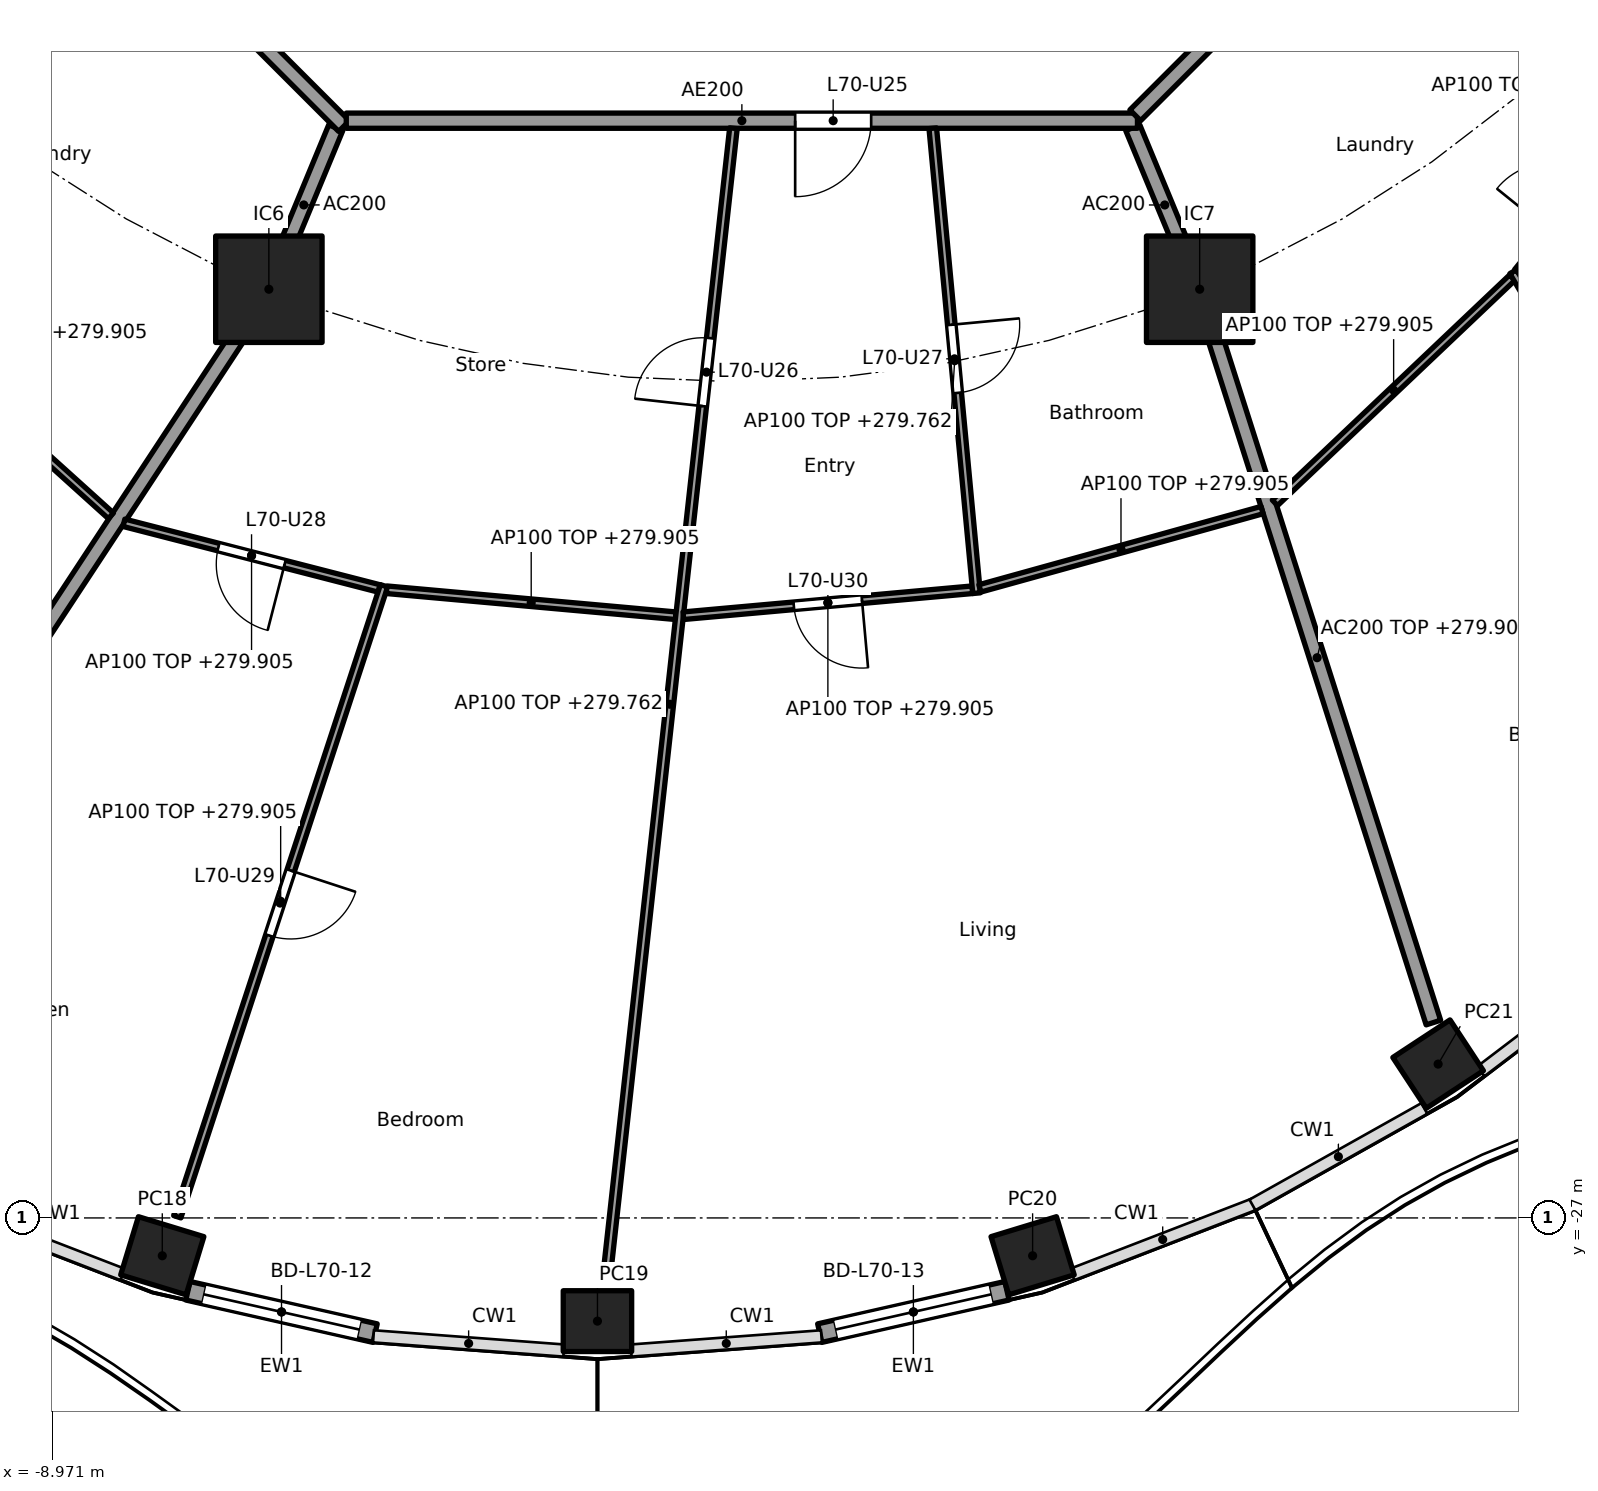
"""IFC4 building model, lengths in metres.
Left out: names, types, materials, properties, quantities, classifications, styles, units other than length and angle.
Written with IfcOpenShell. Run it as: python <this file> out.ifc"""

import sys

from ifc_helpers import new_model, si_unit, direction, frame, frame_2d, origin, origin_2d, place, context, subcontext, project, spatial, rectangle, hollow_rectangle, extrude, element, fill, save


model = new_model("IFC4")
c1 = context("Model", 3, precision=1e-05, world=origin(), true_north=direction((0.0, 1.0)))
c2 = subcontext(c1, "Body", "Model", "MODEL_VIEW")
j1 = project(units=[si_unit("LENGTHUNIT", "METRE"), si_unit("PLANEANGLEUNIT", "RADIAN")], contexts=[c1])
p1 = place(None, origin())
s1 = spatial("IfcSite", under=j1, at=p1, CompositionType="ELEMENT")
p2 = place(p1, origin())
s2 = spatial("IfcBuilding", under=s1, at=p2, CompositionType="ELEMENT")
p3 = place(p2, frame((0.0, 0.0, 277.0)))
s3 = spatial("IfcBuildingStorey", under=s2, at=p3, CompositionType="ELEMENT", Elevation=277.0)
for number, where, z_axis, x_axis in (
    (1, (-7.525, -27.498, 0.0), (0.0, 0.0, 1.0), (0.957, -0.292, 0.0)),
    (2, (-1.8, -28.358, 0.0), (0.0, 0.0, 1.0), (1.0, 0.0, 0.0)),
    (3, (3.925, -27.498, 0.0), (0.0, 0.0, 1.0), (0.957, 0.292, 0.0)),
    (4, (9.26, -24.976, 0.0), (0.0, 0.0, 1.0), (0.836, 0.549, 0.0)),
):
    element("IfcColumn", number, at=place(p3, frame(where, z_axis=z_axis, x_axis=x_axis)), inside=s3, PredefinedType="COLUMN", context=c2, shape_type="SweptSolid", body=[
        extrude(hollow_rectangle(XDim=0.9, YDim=0.8, WallThickness=0.028, at=origin_2d()), origin(), (0.0, 0.0, 1.0), 3.7),
    ])
for number, where, z_axis, x_axis in (
    (5, (-6.123, -14.782, 0.0), (0.0, 0.0, 1.0), (1.0, 0.0, 0.0)),
    (6, (6.123, -14.782, 0.0), (0.0, 0.0, 1.0), (1.0, 0.0, 0.0)),
):
    element("IfcColumn", number, at=place(p3, frame(where, z_axis=z_axis, x_axis=x_axis)), inside=s3, PredefinedType="COLUMN", context=c2, shape_type="SweptSolid", body=[
        extrude(rectangle(XDim=1.4, YDim=1.4, at=origin_2d()), origin(), (0.0, 0.0, 1.0), 3.7),
    ])
p4 = place(p3, frame((-4.725, -28.516, 0.0), z_axis=(0.0, 0.0, 1.0), x_axis=(-0.975319584032, 0.220797891756, 0.0)))
e7 = element("IfcWall", 7, at=p4, inside=s3, PredefinedType="SOLIDWALL", context=c2, shape_type="SweptSolid", body=[
    extrude(rectangle(XDim=2.525, YDim=0.25, at=frame_2d((1.263, 0.0))), origin(), (0.0, 0.0, 1.0), 3.44),
])
p5 = place(p4, frame((0.213, 0.0, 0.0)))
e8 = element("IfcOpeningElement", 8, at=p5, cuts=e7, PredefinedType="OPENING", context=c2, shape_type="SweptSolid", body=[
    extrude(rectangle(XDim=2.1, YDim=2.4, at=frame_2d((1.05, 1.2))), frame((0.0, 0.135, 0.0), z_axis=(0.0, -1.0, 0.0), x_axis=(1.0, 0.0, 0.0)), (0.0, 0.0, 1.0), 0.27),
])
p6 = place(p3, frame((3.588, -27.958, 0.0), z_axis=(0.0, 0.0, 1.0), x_axis=(-0.97531487046, -0.22081871175, 0.0)))
e9 = element("IfcWall", 9, at=p6, inside=s3, PredefinedType="SOLIDWALL", context=c2, shape_type="SweptSolid", body=[
    extrude(rectangle(XDim=2.525, YDim=0.25, at=frame_2d((1.263, 0.0))), origin(), (0.0, 0.0, 1.0), 3.44),
])
p7 = place(p6, frame((0.213, 0.0, 0.0)))
e10 = element("IfcOpeningElement", 10, at=p7, cuts=e9, PredefinedType="OPENING", context=c2, shape_type="SweptSolid", body=[
    extrude(rectangle(XDim=2.1, YDim=2.4, at=frame_2d((1.05, 1.2))), frame((0.0, 0.135, 0.0), z_axis=(0.0, -1.0, 0.0), x_axis=(1.0, 0.0, 0.0)), (0.0, 0.0, 1.0), 0.27),
])
p8 = place(p3, frame((-5.243, -12.657, 0.0), z_axis=(0.0, 0.0, 1.0), x_axis=(-0.382770106157, -0.923843626288, 0.0)))
e11 = element("IfcWall", 11, at=p8, inside=s3, PredefinedType="PARTITIONING", context=c2, shape_type="SweptSolid", body=[
    extrude(rectangle(XDim=2.199, YDim=0.2, at=frame_2d((1.1, 0.0))), origin(), (0.0, 0.0, 1.0), 3.44),
])
p9 = place(p3, frame((-6.151, -14.824, 0.0), z_axis=(0.0, 0.0, 1.0), x_axis=(-0.549345577828, -0.835595258556, 0.0)))
e12 = element("IfcWall", 12, at=p9, inside=s3, PredefinedType="PARTITIONING", context=c2, shape_type="SweptSolid", body=[
    extrude(rectangle(XDim=11.62, YDim=0.2, at=frame_2d((5.81, 0.0))), origin(), (0.0, 0.0, 1.0), 2.905),
])
p10 = place(p3, frame((5.243, -12.657, 0.0), z_axis=(0.0, 0.0, 1.0), x_axis=(0.382707856524, -0.923869415315, 0.0)))
e13 = element("IfcWall", 13, at=p10, inside=s3, PredefinedType="PARTITIONING", context=c2, shape_type="SweptSolid", body=[
    extrude(rectangle(XDim=2.2, YDim=0.2, at=frame_2d((1.1, 0.0))), origin(), (0.0, 0.0, 1.0), 3.44),
])
p11 = place(p3, frame((6.138, -14.83, 0.0), z_axis=(0.0, 0.0, 1.0), x_axis=(0.303653679037, -0.952782474234, 0.0)))
e14 = element("IfcWall", 14, at=p11, inside=s3, PredefinedType="PARTITIONING", context=c2, shape_type="SweptSolid", body=[
    extrude(rectangle(XDim=10.076, YDim=0.2, at=frame_2d((5.038, 0.0))), origin(), (0.0, 0.0, 1.0), 2.905),
])
p12 = place(p3, frame((-12.635, -5.134, 0.0), z_axis=(0.0, 0.0, 1.0), x_axis=(0.707106781187, -0.707106781187, 0.0)))
e15 = element("IfcWall", 15, at=p12, inside=s3, PredefinedType="PARTITIONING", context=c2, shape_type="SweptSolid", body=[
    extrude(rectangle(XDim=10.609, YDim=0.2, at=frame_2d((5.305, 0.0))), origin(), (0.0, 0.0, 1.0), 3.44),
])
p13 = place(p3, frame((-5.104, -12.565, 0.0), z_axis=(0.0, 0.0, 1.0), x_axis=(1.0, 0.0, 0.0)))
e16 = element("IfcWall", 16, at=p13, inside=s3, PredefinedType="PARTITIONING", context=c2, shape_type="SweptSolid", body=[
    extrude(rectangle(XDim=10.409, YDim=0.2, at=frame_2d((5.205, 0.0))), origin(), (0.0, 0.0, 1.0), 3.44),
])
p14 = place(p13, frame((5.906, 0.0, 0.0)))
e17 = element("IfcOpeningElement", 17, at=p14, cuts=e16, PredefinedType="OPENING", context=c2, shape_type="SweptSolid", body=[
    extrude(rectangle(XDim=1.0, YDim=2.1, at=frame_2d((0.5, 1.05))), frame((0.0, 0.11, 0.0), z_axis=(0.0, -1.0, 0.0), x_axis=(1.0, 0.0, 0.0)), (0.0, 0.0, 1.0), 0.22),
])
p15 = place(p3, frame((5.275, -12.494, 0.0), z_axis=(0.0, 0.0, 1.0), x_axis=(0.707106781187, 0.707106781187, 0.0)))
e18 = element("IfcWall", 18, at=p15, inside=s3, PredefinedType="PARTITIONING", context=c2, shape_type="SweptSolid", body=[
    extrude(rectangle(XDim=10.409, YDim=0.2, at=frame_2d((5.205, 0.0))), origin(), (0.0, 0.0, 1.0), 3.44),
])
p16 = place(p3, frame((-8.958, -8.952, 0.0), z_axis=(0.0, 0.0, 1.0), x_axis=(-0.73876526954, -0.673962815385, 0.0)))
e19 = element("IfcWall", 19, at=p16, inside=s3, PredefinedType="PARTITIONING", context=c2, shape_type="SweptSolid", body=[
    extrude(rectangle(XDim=5.647, YDim=0.1, at=frame_2d((2.824, 0.0))), origin(), (0.0, 0.0, 1.0), 2.762),
])
p17 = place(p3, frame((-11.676, -14.628, 0.0), z_axis=(0.0, 0.0, 1.0), x_axis=(0.74245829867, -0.669892285921, 0.0)))
e20 = element("IfcWall", 20, at=p17, inside=s3, PredefinedType="PARTITIONING", context=c2, shape_type="SweptSolid", body=[
    extrude(rectangle(XDim=4.68, YDim=0.1, at=frame_2d((2.34, 0.0))), origin(), (0.0, 0.0, 1.0), 2.905),
])
p18 = place(p3, frame((-8.03, -17.854, 0.0), z_axis=(0.0, 0.0, 1.0), x_axis=(0.968441967324, -0.249239154077, 0.0)))
e21 = element("IfcWall", 21, at=p18, inside=s3, PredefinedType="PARTITIONING", context=c2, shape_type="SweptSolid", body=[
    extrude(rectangle(XDim=3.468, YDim=0.1, at=frame_2d((1.734, 0.0))), origin(), (0.0, 0.0, 1.0), 2.905),
])
p19 = place(p18, frame((1.284, 0.0, 0.0)))
e22 = element("IfcOpeningElement", 22, at=p19, cuts=e21, PredefinedType="OPENING", context=c2, shape_type="SweptSolid", body=[
    extrude(rectangle(XDim=0.9, YDim=2.1, at=frame_2d((0.45, 1.05))), frame((0.0, 0.06, 0.0), z_axis=(0.0, -1.0, 0.0), x_axis=(1.0, 0.0, 0.0)), (0.0, 0.0, 1.0), 0.12),
])
p20 = place(p3, frame((-4.608, -18.684, 0.0), z_axis=(0.0, 0.0, 1.0), x_axis=(-0.311419102378, -0.95027266754, 0.0)))
e23 = element("IfcWall", 23, at=p20, inside=s3, PredefinedType="PARTITIONING", context=c2, shape_type="SweptSolid", body=[
    extrude(rectangle(XDim=8.735, YDim=0.1, at=frame_2d((4.367, 0.0))), origin(), (0.0, 0.0, 1.0), 2.905),
])
p21 = place(p20, frame((3.942, 0.0, 0.0)))
e24 = element("IfcOpeningElement", 24, at=p21, cuts=e23, PredefinedType="OPENING", context=c2, shape_type="SweptSolid", body=[
    extrude(rectangle(XDim=0.9, YDim=2.1, at=frame_2d((0.45, 1.05))), frame((0.0, 0.06, 0.0), z_axis=(0.0, -1.0, 0.0), x_axis=(1.0, 0.0, 0.0)), (0.0, 0.0, 1.0), 0.12),
])
p22 = place(p3, frame((-4.573, -18.736, 0.0), z_axis=(0.0, 0.0, 1.0), x_axis=(0.995986472869, -0.089503887414, 0.0)))
e25 = element("IfcWall", 25, at=p22, inside=s3, PredefinedType="PARTITIONING", context=c2, shape_type="SweptSolid", body=[
    extrude(rectangle(XDim=3.819, YDim=0.1, at=frame_2d((1.909, 0.0))), origin(), (0.0, 0.0, 1.0), 2.905),
])
p23 = place(p3, frame((-0.011, -12.664, 0.0), z_axis=(0.0, 0.0, 1.0), x_axis=(-0.109805889692, -0.993953050495, 0.0)))
e26 = element("IfcWall", 26, at=p23, inside=s3, PredefinedType="PARTITIONING", context=c2, shape_type="SweptSolid", body=[
    extrude(rectangle(XDim=15.248, YDim=0.1, at=frame_2d((7.624, 0.0))), origin(), (0.0, 0.0, 1.0), 2.762),
])
p24 = place(p23, frame((2.778, 0.0, 0.0)))
e27 = element("IfcOpeningElement", 27, at=p24, cuts=e26, PredefinedType="OPENING", context=c2, shape_type="SweptSolid", body=[
    extrude(rectangle(XDim=0.9, YDim=2.1, at=frame_2d((0.45, 1.05))), frame((0.0, 0.06, 0.0), z_axis=(0.0, -1.0, 0.0), x_axis=(1.0, 0.0, 0.0)), (0.0, 0.0, 1.0), 0.12),
])
p25 = place(p3, frame((-0.67, -19.077, 0.0), z_axis=(0.0, 0.0, 1.0), x_axis=(0.995986472869, 0.089503887414, 0.0)))
e28 = element("IfcWall", 28, at=p25, inside=s3, PredefinedType="PARTITIONING", context=c2, shape_type="SweptSolid", body=[
    extrude(rectangle(XDim=3.819, YDim=0.1, at=frame_2d((1.909, 0.0))), origin(), (0.0, 0.0, 1.0), 2.905),
])
p26 = place(p25, frame((1.459, 0.0, 0.0)))
e29 = element("IfcOpeningElement", 29, at=p26, cuts=e28, PredefinedType="OPENING", context=c2, shape_type="SweptSolid", body=[
    extrude(rectangle(XDim=0.9, YDim=2.1, at=frame_2d((0.45, 1.05))), frame((0.0, 0.06, 0.0), z_axis=(0.0, -1.0, 0.0), x_axis=(1.0, 0.0, 0.0)), (0.0, 0.0, 1.0), 0.12),
])
p27 = place(p3, frame((2.612, -12.664, 0.0), z_axis=(0.0, 0.0, 1.0), x_axis=(0.093781393779, -0.995592813444, 0.0)))
e30 = element("IfcWall", 30, at=p27, inside=s3, PredefinedType="PARTITIONING", context=c2, shape_type="SweptSolid", body=[
    extrude(rectangle(XDim=6.144, YDim=0.1, at=frame_2d((3.072, 0.0))), origin(), (0.0, 0.0, 1.0), 2.762),
])
p28 = place(p27, frame((2.597, 0.0, 0.0)))
e31 = element("IfcOpeningElement", 31, at=p28, cuts=e30, PredefinedType="OPENING", context=c2, shape_type="SweptSolid", body=[
    extrude(rectangle(XDim=0.9, YDim=2.1, at=frame_2d((0.45, 1.05))), frame((0.0, 0.06, 0.0), z_axis=(0.0, -1.0, 0.0), x_axis=(1.0, 0.0, 0.0)), (0.0, 0.0, 1.0), 0.12),
])
p29 = place(p3, frame((3.231, -18.718, 0.0), z_axis=(0.0, 0.0, 1.0), x_axis=(0.963606817151, 0.267323590318, 0.0)))
e32 = element("IfcWall", 32, at=p29, inside=s3, PredefinedType="PARTITIONING", context=c2, shape_type="SweptSolid", body=[
    extrude(rectangle(XDim=3.853, YDim=0.1, at=frame_2d((1.927, 0.0))), origin(), (0.0, 0.0, 1.0), 2.905),
])
p30 = place(p3, frame((7.113, -17.592, 0.0), z_axis=(0.0, 0.0, 1.0), x_axis=(0.725433932329, 0.688291805723, 0.0)))
e33 = element("IfcWall", 33, at=p30, inside=s3, PredefinedType="PARTITIONING", context=c2, shape_type="SweptSolid", body=[
    extrude(rectangle(XDim=4.305, YDim=0.1, at=frame_2d((2.153, 0.0))), origin(), (0.0, 0.0, 1.0), 2.905),
])
p31 = place(p3, frame((10.248, -14.551, 0.0), z_axis=(0.0, 0.0, 1.0), x_axis=(0.503826483408, -0.86380488226, 0.0)))
e34 = element("IfcWall", 34, at=p31, inside=s3, PredefinedType="PARTITIONING", context=c2, shape_type="SweptSolid", body=[
    extrude(rectangle(XDim=6.816, YDim=0.1, at=frame_2d((3.408, 0.0))), origin(), (0.0, 0.0, 1.0), 3.44),
])
p32 = place(p31, frame((2.983, 0.0, 0.0)))
e35 = element("IfcOpeningElement", 35, at=p32, cuts=e34, PredefinedType="OPENING", context=c2, shape_type="SweptSolid", body=[
    extrude(rectangle(XDim=0.9, YDim=2.1, at=frame_2d((0.45, 1.05))), frame((0.0, 0.06, 0.0), z_axis=(0.0, -1.0, 0.0), x_axis=(1.0, 0.0, 0.0)), (0.0, 0.0, 1.0), 0.12),
])
p33 = place(p3, frame((10.304, -14.555, 0.0), z_axis=(0.0, 0.0, 1.0), x_axis=(0.628170338674, 0.778075848237, 0.0)))
e36 = element("IfcWall", 36, at=p33, inside=s3, PredefinedType="PARTITIONING", context=c2, shape_type="SweptSolid", body=[
    extrude(rectangle(XDim=4.532, YDim=0.1, at=frame_2d((2.266, 0.0))), origin(), (0.0, 0.0, 1.0), 2.905),
])
p34 = place(p33, frame((0.683, 0.0, 0.0)))
e37 = element("IfcOpeningElement", 37, at=p34, cuts=e36, PredefinedType="OPENING", context=c2, shape_type="SweptSolid", body=[
    extrude(rectangle(XDim=0.9, YDim=2.1, at=frame_2d((0.45, 1.05))), frame((0.0, 0.06, 0.0), z_axis=(0.0, -1.0, 0.0), x_axis=(1.0, 0.0, 0.0)), (0.0, 0.0, 1.0), 0.12),
])
p35 = place(p3, frame((8.943, -8.966, 0.0), z_axis=(0.0, 0.0, 1.0), x_axis=(0.588357698232, -0.808600778463, 0.0)))
e38 = element("IfcWall", 38, at=p35, inside=s3, PredefinedType="PARTITIONING", context=c2, shape_type="SweptSolid", body=[
    extrude(rectangle(XDim=4.682, YDim=0.1, at=frame_2d((2.341, 0.0))), origin(), (0.0, 0.0, 1.0), 2.762),
])
p36 = place(p35, frame((1.891, 0.0, 0.0)))
e39 = element("IfcOpeningElement", 39, at=p36, cuts=e38, PredefinedType="OPENING", context=c2, shape_type="SweptSolid", body=[
    extrude(rectangle(XDim=0.9, YDim=2.1, at=frame_2d((0.45, 1.05))), frame((0.0, 0.06, 0.0), z_axis=(0.0, -1.0, 0.0), x_axis=(1.0, 0.0, 0.0)), (0.0, 0.0, 1.0), 0.12),
])
p37 = place(p5, origin())
e40 = element("IfcDoor", 40, at=p37, inside=s3, OperationType="SLIDING_TO_LEFT", PredefinedType="DOOR", context=c2, shape_type="SweptSolid", body=[
    extrude(rectangle(XDim=2.1, YDim=2.4, at=frame_2d((1.05, 1.2))), frame((0.0, 0.025, 0.0), z_axis=(0.0, -1.0, 0.0), x_axis=(1.0, 0.0, 0.0)), (0.0, 0.0, 1.0), 0.05),
])
fill(e8, e40)
p38 = place(p7, origin())
e41 = element("IfcDoor", 41, at=p38, inside=s3, OperationType="SLIDING_TO_LEFT", PredefinedType="DOOR", context=c2, shape_type="SweptSolid", body=[
    extrude(rectangle(XDim=2.1, YDim=2.4, at=frame_2d((1.05, 1.2))), frame((0.0, 0.025, 0.0), z_axis=(0.0, -1.0, 0.0), x_axis=(1.0, 0.0, 0.0)), (0.0, 0.0, 1.0), 0.05),
])
fill(e10, e41)
p39 = place(p14, frame((1.0, 0.0, 0.0), x_axis=(-1.0, 0.0, 0.0)))
e42 = element("IfcDoor", 42, at=p39, inside=s3, OperationType="SINGLE_SWING_RIGHT", PredefinedType="DOOR", context=c2, shape_type="SweptSolid", body=[
    extrude(rectangle(XDim=1.0, YDim=2.1, at=frame_2d((0.5, 1.05))), frame((0.0, 0.025, 0.0), z_axis=(0.0, -1.0, 0.0), x_axis=(1.0, 0.0, 0.0)), (0.0, 0.0, 1.0), 0.05),
])
fill(e17, e42)
p40 = place(p24, frame((0.9, 0.0, 0.0), x_axis=(-1.0, 0.0, 0.0)))
e43 = element("IfcDoor", 43, at=p40, inside=s3, OperationType="SINGLE_SWING_LEFT", PredefinedType="DOOR", context=c2, shape_type="SweptSolid", body=[
    extrude(rectangle(XDim=0.9, YDim=2.1, at=frame_2d((0.45, 1.05))), frame((0.0, 0.025, 0.0), z_axis=(0.0, -1.0, 0.0), x_axis=(1.0, 0.0, 0.0)), (0.0, 0.0, 1.0), 0.05),
])
fill(e27, e43)
p41 = place(p28, origin())
e44 = element("IfcDoor", 44, at=p41, inside=s3, OperationType="SINGLE_SWING_LEFT", PredefinedType="DOOR", context=c2, shape_type="SweptSolid", body=[
    extrude(rectangle(XDim=0.9, YDim=2.1, at=frame_2d((0.45, 1.05))), frame((0.0, 0.025, 0.0), z_axis=(0.0, -1.0, 0.0), x_axis=(1.0, 0.0, 0.0)), (0.0, 0.0, 1.0), 0.05),
])
fill(e31, e44)
p42 = place(p19, frame((0.9, 0.0, 0.0), x_axis=(-1.0, 0.0, 0.0)))
e45 = element("IfcDoor", 45, at=p42, inside=s3, OperationType="SINGLE_SWING_LEFT", PredefinedType="DOOR", context=c2, shape_type="SweptSolid", body=[
    extrude(rectangle(XDim=0.9, YDim=2.1, at=frame_2d((0.45, 1.05))), frame((0.0, 0.025, 0.0), z_axis=(0.0, -1.0, 0.0), x_axis=(1.0, 0.0, 0.0)), (0.0, 0.0, 1.0), 0.05),
])
fill(e22, e45)
p43 = place(p21, origin())
e46 = element("IfcDoor", 46, at=p43, inside=s3, OperationType="SINGLE_SWING_LEFT", PredefinedType="DOOR", context=c2, shape_type="SweptSolid", body=[
    extrude(rectangle(XDim=0.9, YDim=2.1, at=frame_2d((0.45, 1.05))), frame((0.0, 0.025, 0.0), z_axis=(0.0, -1.0, 0.0), x_axis=(1.0, 0.0, 0.0)), (0.0, 0.0, 1.0), 0.05),
])
fill(e24, e46)
p44 = place(p26, frame((0.9, 0.0, 0.0), x_axis=(-1.0, 0.0, 0.0)))
e47 = element("IfcDoor", 47, at=p44, inside=s3, OperationType="SINGLE_SWING_LEFT", PredefinedType="DOOR", context=c2, shape_type="SweptSolid", body=[
    extrude(rectangle(XDim=0.9, YDim=2.1, at=frame_2d((0.45, 1.05))), frame((0.0, 0.025, 0.0), z_axis=(0.0, -1.0, 0.0), x_axis=(1.0, 0.0, 0.0)), (0.0, 0.0, 1.0), 0.05),
])
fill(e29, e47)
save(model, sys.argv[1])
